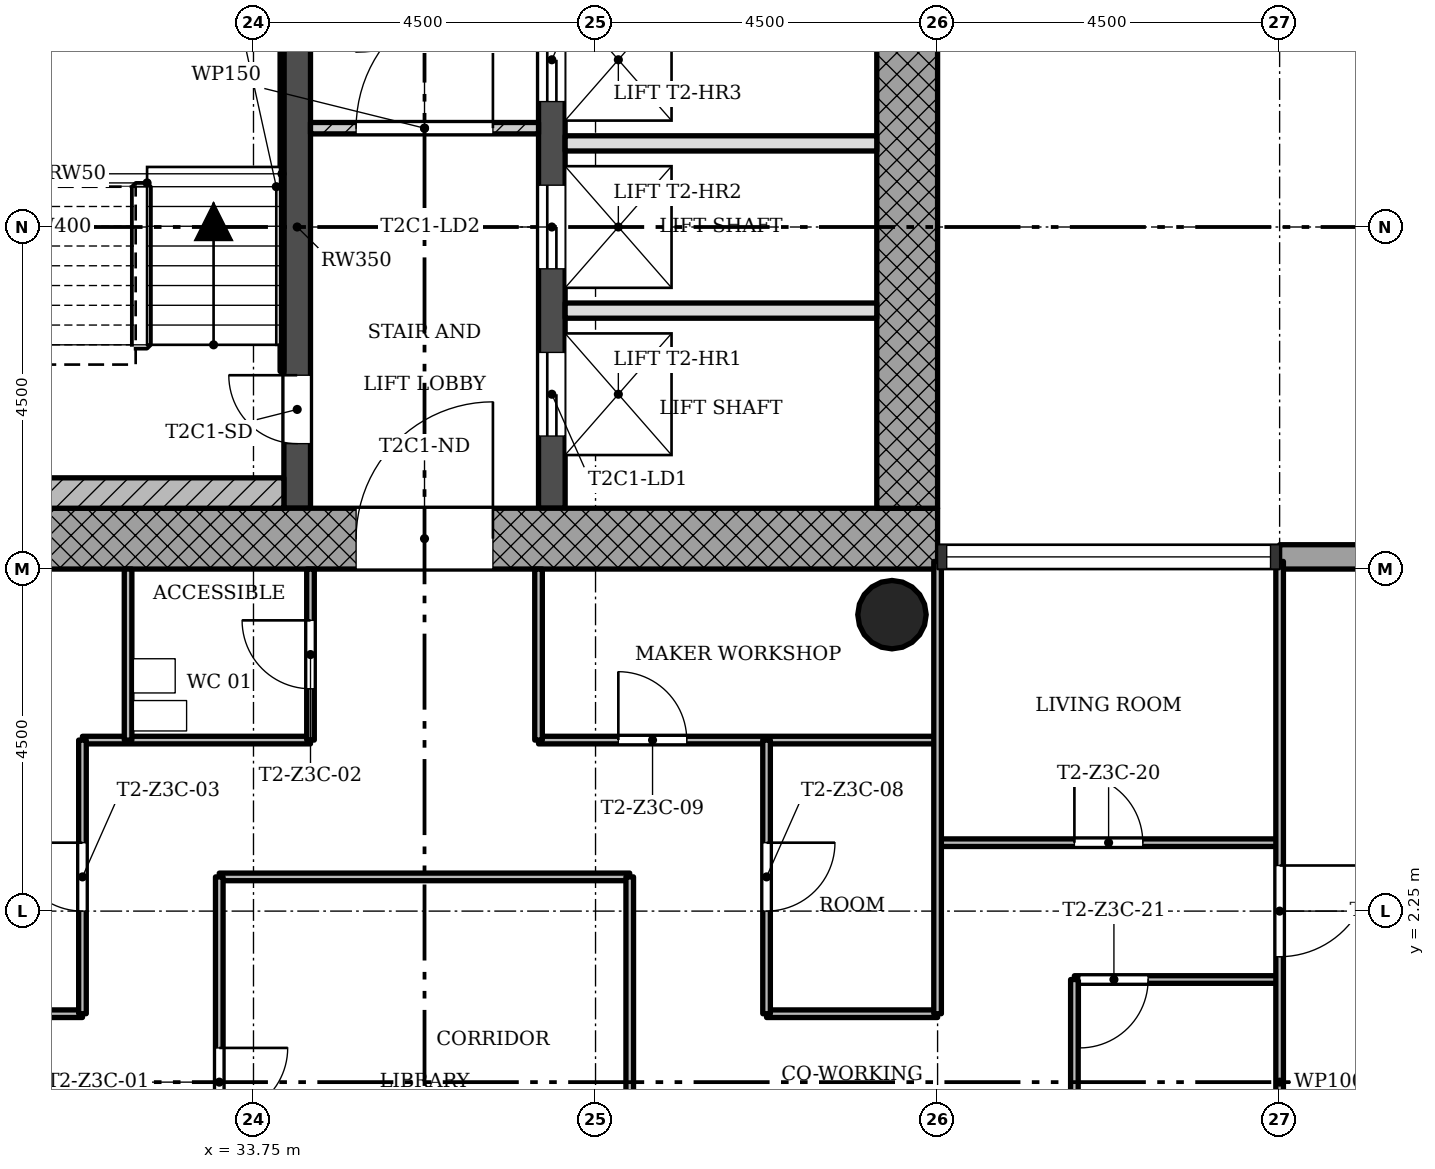
"""IFC4 building model, lengths in metres.
Left out: names, types, materials, properties, quantities, classifications, styles, units other than length and angle.
Written with IfcOpenShell. Run it as: python <this file> out.ifc"""

import sys

from ifc_helpers import new_model, si_unit, direction, frame, frame_2d, origin, origin_2d, place, context, subcontext, project, spatial, rectangle, hollow_circle, extrude, element, fill, save


model = new_model("IFC4")
c1 = context("Model", 3, precision=1e-05, world=origin(), true_north=direction((0.0, 1.0)))
c2 = subcontext(c1, "Body", "Model", "MODEL_VIEW")
j1 = project(units=[si_unit("LENGTHUNIT", "METRE"), si_unit("PLANEANGLEUNIT", "RADIAN")], contexts=[c1])
p1 = place(None, origin())
s1 = spatial("IfcSite", under=j1, at=p1, CompositionType="ELEMENT")
p2 = place(p1, origin())
s2 = spatial("IfcBuilding", under=s1, at=p2, CompositionType="ELEMENT")
p3 = place(p2, frame((0.0, 0.0, 157.5)))
s3 = spatial("IfcBuildingStorey", under=s2, at=p3, CompositionType="ELEMENT", Elevation=157.5)
p4 = place(p3, frame((30.05, 7.15, 0.0), z_axis=(0.0, 0.0, 1.0), x_axis=(1.0, 0.0, 0.0)))
e1 = element("IfcWall", 1, at=p4, inside=s3, PredefinedType="SHEAR", context=c2, shape_type="SweptSolid", body=[
    extrude(rectangle(XDim=12.7, YDim=0.8, at=frame_2d((6.35, 0.0))), origin(), (0.0, 0.0, 1.0), 3.4),
])
p5 = place(p4, frame((5.05, 0.0, 0.0)))
e2 = element("IfcOpeningElement", 2, at=p5, cuts=e1, PredefinedType="OPENING", context=c2, shape_type="SweptSolid", body=[
    extrude(rectangle(XDim=1.8, YDim=2.1, at=frame_2d((0.9, 1.05))), frame((0.0, 0.41, 0.0), z_axis=(0.0, -1.0, 0.0), x_axis=(1.0, 0.0, 0.0)), (0.0, 0.0, 1.0), 0.82),
])
p6 = place(p3, frame((42.35, 7.55, 0.0), z_axis=(0.0, 0.0, 1.0), x_axis=(0.0, 1.0, 0.0)))
e3 = element("IfcWall", 3, at=p6, inside=s3, PredefinedType="SHEAR", context=c2, shape_type="SweptSolid", body=[
    extrude(rectangle(XDim=8.2, YDim=0.8, at=frame_2d((4.1, 0.0))), origin(), (0.0, 0.0, 1.0), 3.4),
])
p7 = place(p3, frame((34.325, 7.55, 0.0), z_axis=(0.0, 0.0, 1.0), x_axis=(0.0, 1.0, 0.0)))
e4 = element("IfcWall", 4, at=p7, inside=s3, PredefinedType="SHEAR", context=c2, shape_type="SweptSolid", body=[
    extrude(rectangle(XDim=7.4, YDim=0.35, at=frame_2d((3.7, 0.0))), origin(), (0.0, 0.0, 1.0), 3.4),
])
p8 = place(p7, frame((0.85, 0.0, 0.0)))
e5 = element("IfcOpeningElement", 5, at=p8, cuts=e4, PredefinedType="OPENING", context=c2, shape_type="SweptSolid", body=[
    extrude(rectangle(XDim=0.9, YDim=2.1, at=frame_2d((0.45, 1.05))), frame((0.0, 0.185, 0.0), z_axis=(0.0, -1.0, 0.0), x_axis=(1.0, 0.0, 0.0)), (0.0, 0.0, 1.0), 0.37),
])
p9 = place(p3, frame((37.675, 7.55, 0.0), z_axis=(0.0, 0.0, 1.0), x_axis=(0.0, 1.0, 0.0)))
e6 = element("IfcWall", 6, at=p9, inside=s3, PredefinedType="SHEAR", context=c2, shape_type="SweptSolid", body=[
    extrude(rectangle(XDim=7.4, YDim=0.35, at=frame_2d((3.7, 0.0))), origin(), (0.0, 0.0, 1.0), 3.4),
])
p10 = place(p9, frame((0.95, 0.0, 0.0)))
e7 = element("IfcOpeningElement", 7, at=p10, cuts=e6, PredefinedType="OPENING", context=c2, shape_type="SweptSolid", body=[
    extrude(rectangle(XDim=1.1, YDim=2.1, at=frame_2d((0.55, 1.05))), frame((0.0, 0.185, 0.0), z_axis=(0.0, -1.0, 0.0), x_axis=(1.0, 0.0, 0.0)), (0.0, 0.0, 1.0), 0.37),
])
p11 = place(p9, frame((3.15, 0.0, 0.0)))
e8 = element("IfcOpeningElement", 8, at=p11, cuts=e6, PredefinedType="OPENING", context=c2, shape_type="SweptSolid", body=[
    extrude(rectangle(XDim=1.1, YDim=2.1, at=frame_2d((0.55, 1.05))), frame((0.0, 0.185, 0.0), z_axis=(0.0, -1.0, 0.0), x_axis=(1.0, 0.0, 0.0)), (0.0, 0.0, 1.0), 0.37),
])
p12 = place(p9, frame((5.35, 0.0, 0.0)))
e9 = element("IfcOpeningElement", 9, at=p12, cuts=e6, PredefinedType="OPENING", context=c2, shape_type="SweptSolid", body=[
    extrude(rectangle(XDim=1.1, YDim=2.1, at=frame_2d((0.55, 1.05))), frame((0.0, 0.185, 0.0), z_axis=(0.0, -1.0, 0.0), x_axis=(1.0, 0.0, 0.0)), (0.0, 0.0, 1.0), 0.37),
])
p13 = place(p3, frame((42.15, 6.15, 0.0), z_axis=(0.0, 0.0, 1.0), x_axis=(1.0, 0.0, 0.0)))
e10 = element("IfcColumn", 10, at=p13, inside=s3, PredefinedType="COLUMN", context=c2, shape_type="SweptSolid", body=[
    extrude(hollow_circle(Radius=0.45, WallThickness=0.032, at=origin_2d()), origin(), (0.0, 0.0, 1.0), 3.4),
])
p14 = place(p3, frame((48.75, 6.91, -0.3), z_axis=(0.0, 0.0, 1.0), x_axis=(-1.0, 0.0, 0.0)))
e11 = element("IfcWall", 11, at=p14, inside=s3, PredefinedType="STANDARD", context=c2, shape_type="SweptSolid", body=[
    extrude(rectangle(XDim=1.5, YDim=0.32, at=frame_2d((0.75, 0.0))), origin(), (0.0, 0.0, 1.0), 3.4),
])
p15 = place(p3, frame((37.5, 12.55, 0.0), z_axis=(0.0, 0.0, 1.0), x_axis=(-1.0, 0.0, 0.0)))
e12 = element("IfcWall", 12, at=p15, inside=s3, PredefinedType="PARTITIONING", context=c2, shape_type="SweptSolid", body=[
    extrude(rectangle(XDim=3.0, YDim=0.15, at=frame_2d((1.5, 0.0))), origin(), (0.0, 0.0, 1.0), 3.0),
])
p16 = place(p15, frame((0.6, 0.0, 0.0)))
e13 = element("IfcOpeningElement", 13, at=p16, cuts=e12, PredefinedType="OPENING", context=c2, shape_type="SweptSolid", body=[
    extrude(rectangle(XDim=1.8, YDim=2.1, at=frame_2d((0.9, 1.05))), frame((0.0, 0.085, 0.0), z_axis=(0.0, -1.0, 0.0), x_axis=(1.0, 0.0, 0.0)), (0.0, 0.0, 1.0), 0.17),
])
for number, where, z_axis, x_axis in (
    (14, (41.95, 10.15, 0.0), (0.0, 0.0, 1.0), (-1.0, 0.0, 0.0)),
    (15, (41.95, 12.35, 0.0), (0.0, 0.0, 1.0), (-1.0, 0.0, 0.0)),
):
    element("IfcWall", number, at=place(p3, frame(where, z_axis=z_axis, x_axis=x_axis)), inside=s3, PredefinedType="SOLIDWALL", context=c2, shape_type="SweptSolid", body=[
        extrude(rectangle(XDim=4.1, YDim=0.2, at=frame_2d((2.05, 0.0))), origin(), (0.0, 0.0, 1.0), 3.0),
    ])
for number, where, z_axis, x_axis in (
    (16, (42.75, 0.9, 0.0), (0.0, 0.0, 1.0), (-1.0, 0.0, 0.0)),
    (17, (31.5, 0.9, 0.0), (0.0, 0.0, 1.0), (-1.0, 0.0, 0.0)),
):
    element("IfcWall", number, at=place(p3, frame(where, z_axis=z_axis, x_axis=x_axis)), inside=s3, PredefinedType="PARTITIONING", context=c2, shape_type="SweptSolid", body=[
        extrude(rectangle(XDim=2.25, YDim=0.1, at=frame_2d((1.125, 0.0))), origin(), (0.0, 0.0, 1.0), 3.0),
    ])
p17 = place(p3, frame((47.25, 1.35, 0.0), z_axis=(0.0, 0.0, 1.0), x_axis=(-1.0, 0.0, 0.0)))
e18 = element("IfcWall", 18, at=p17, inside=s3, PredefinedType="PARTITIONING", context=c2, shape_type="SweptSolid", body=[
    extrude(rectangle(XDim=2.7, YDim=0.1, at=frame_2d((1.35, 0.0))), origin(), (0.0, 0.0, 1.0), 3.0),
])
p18 = place(p17, frame((1.73, 0.0, 0.0)))
e19 = element("IfcOpeningElement", 19, at=p18, cuts=e18, PredefinedType="OPENING", context=c2, shape_type="SweptSolid", body=[
    extrude(rectangle(XDim=0.9, YDim=2.1, at=frame_2d((0.45, 1.05))), frame((0.0, 0.06, 0.0), z_axis=(0.0, -1.0, 0.0), x_axis=(1.0, 0.0, 0.0)), (0.0, 0.0, 1.0), 0.12),
])
p19 = place(p3, frame((38.7, 2.7, 0.0), z_axis=(0.0, 0.0, 1.0), x_axis=(-1.0, 0.0, 0.0)))
e20 = element("IfcWall", 20, at=p19, inside=s3, PredefinedType="PARTITIONING", context=c2, shape_type="SweptSolid", body=[
    extrude(rectangle(XDim=5.4, YDim=0.1, at=frame_2d((2.7, 0.0))), origin(), (0.0, 0.0, 1.0), 3.0),
])
p20 = place(p3, frame((47.25, 3.15, 0.0), z_axis=(0.0, 0.0, 1.0), x_axis=(-1.0, 0.0, 0.0)))
e21 = element("IfcWall", 21, at=p20, inside=s3, PredefinedType="PARTITIONING", context=c2, shape_type="SweptSolid", body=[
    extrude(rectangle(XDim=4.5, YDim=0.1, at=frame_2d((2.25, 0.0))), origin(), (0.0, 0.0, 1.0), 3.0),
])
p21 = place(p20, frame((1.8, 0.0, 0.0)))
e22 = element("IfcOpeningElement", 22, at=p21, cuts=e21, PredefinedType="OPENING", context=c2, shape_type="SweptSolid", body=[
    extrude(rectangle(XDim=0.9, YDim=2.1, at=frame_2d((0.45, 1.05))), frame((0.0, 0.06, 0.0), z_axis=(0.0, -1.0, 0.0), x_axis=(1.0, 0.0, 0.0)), (0.0, 0.0, 1.0), 0.12),
])
p22 = place(p3, frame((42.75, 4.5, 0.0), z_axis=(0.0, 0.0, 1.0), x_axis=(-1.0, 0.0, 0.0)))
e23 = element("IfcWall", 23, at=p22, inside=s3, PredefinedType="PARTITIONING", context=c2, shape_type="SweptSolid", body=[
    extrude(rectangle(XDim=5.25, YDim=0.1, at=frame_2d((2.625, 0.0))), origin(), (0.0, 0.0, 1.0), 3.0),
])
p23 = place(p22, frame((3.3, 0.0, 0.0)))
e24 = element("IfcOpeningElement", 24, at=p23, cuts=e23, PredefinedType="OPENING", context=c2, shape_type="SweptSolid", body=[
    extrude(rectangle(XDim=0.9, YDim=2.1, at=frame_2d((0.45, 1.05))), frame((0.0, 0.06, 0.0), z_axis=(0.0, -1.0, 0.0), x_axis=(1.0, 0.0, 0.0)), (0.0, 0.0, 1.0), 0.12),
])
p24 = place(p3, frame((34.5, 4.5, 0.0), z_axis=(0.0, 0.0, 1.0), x_axis=(-1.0, 0.0, 0.0)))
e25 = element("IfcWall", 25, at=p24, inside=s3, PredefinedType="PARTITIONING", context=c2, shape_type="SweptSolid", body=[
    extrude(rectangle(XDim=3.0, YDim=0.1, at=frame_2d((1.5, 0.0))), origin(), (0.0, 0.0, 1.0), 3.0),
])
p25 = place(p3, frame((47.25, -6.85, 0.0), z_axis=(0.0, 0.0, 1.0), x_axis=(0.0, 1.0, 0.0)))
e26 = element("IfcWall", 26, at=p25, inside=s3, PredefinedType="PARTITIONING", context=c2, shape_type="SweptSolid", body=[
    extrude(rectangle(XDim=13.7, YDim=0.1, at=frame_2d((6.85, 0.0))), origin(), (0.0, 0.0, 1.0), 3.0),
])
p26 = place(p25, frame((8.5, 0.0, 0.0)))
e27 = element("IfcOpeningElement", 27, at=p26, cuts=e26, PredefinedType="OPENING", context=c2, shape_type="SweptSolid", body=[
    extrude(rectangle(XDim=1.2, YDim=2.1, at=frame_2d((0.6, 1.05))), frame((0.0, 0.06, 0.0), z_axis=(0.0, -1.0, 0.0), x_axis=(1.0, 0.0, 0.0)), (0.0, 0.0, 1.0), 0.12),
])
p27 = place(p3, frame((44.55, -0.9, 0.0), z_axis=(0.0, 0.0, 1.0), x_axis=(0.0, 1.0, 0.0)))
e28 = element("IfcWall", 28, at=p27, inside=s3, PredefinedType="PARTITIONING", context=c2, shape_type="SweptSolid", body=[
    extrude(rectangle(XDim=2.25, YDim=0.1, at=frame_2d((1.125, 0.0))), origin(), (0.0, 0.0, 1.0), 3.0),
])
p28 = place(p3, frame((42.75, 0.9, 0.0), z_axis=(0.0, 0.0, 1.0), x_axis=(0.0, 1.0, 0.0)))
e29 = element("IfcWall", 29, at=p28, inside=s3, PredefinedType="PARTITIONING", context=c2, shape_type="SweptSolid", body=[
    extrude(rectangle(XDim=5.95, YDim=0.1, at=frame_2d((2.975, 0.0))), origin(), (0.0, 0.0, 1.0), 3.0),
])
p29 = place(p3, frame((40.5, 0.9, 0.0), z_axis=(0.0, 0.0, 1.0), x_axis=(0.0, 1.0, 0.0)))
e30 = element("IfcWall", 30, at=p29, inside=s3, PredefinedType="PARTITIONING", context=c2, shape_type="SweptSolid", body=[
    extrude(rectangle(XDim=3.6, YDim=0.1, at=frame_2d((1.8, 0.0))), origin(), (0.0, 0.0, 1.0), 3.0),
])
p30 = place(p29, frame((1.35, 0.0, 0.0)))
e31 = element("IfcOpeningElement", 31, at=p30, cuts=e30, PredefinedType="OPENING", context=c2, shape_type="SweptSolid", body=[
    extrude(rectangle(XDim=0.9, YDim=2.1, at=frame_2d((0.45, 1.05))), frame((0.0, 0.06, 0.0), z_axis=(0.0, -1.0, 0.0), x_axis=(1.0, 0.0, 0.0)), (0.0, 0.0, 1.0), 0.12),
])
p31 = place(p3, frame((38.7, -2.7, 0.0), z_axis=(0.0, 0.0, 1.0), x_axis=(0.0, 1.0, 0.0)))
e32 = element("IfcWall", 32, at=p31, inside=s3, PredefinedType="PARTITIONING", context=c2, shape_type="SweptSolid", body=[
    extrude(rectangle(XDim=5.4, YDim=0.1, at=frame_2d((2.7, 0.0))), origin(), (0.0, 0.0, 1.0), 3.0),
])
p32 = place(p3, frame((37.5, 4.5, 0.0), z_axis=(0.0, 0.0, 1.0), x_axis=(0.0, 1.0, 0.0)))
e33 = element("IfcWall", 33, at=p32, inside=s3, PredefinedType="PARTITIONING", context=c2, shape_type="SweptSolid", body=[
    extrude(rectangle(XDim=2.25, YDim=0.1, at=frame_2d((1.125, 0.0))), origin(), (0.0, 0.0, 1.0), 3.0),
])
p33 = place(p3, frame((34.5, 4.5, 0.0), z_axis=(0.0, 0.0, 1.0), x_axis=(0.0, 1.0, 0.0)))
e34 = element("IfcWall", 34, at=p33, inside=s3, PredefinedType="PARTITIONING", context=c2, shape_type="SweptSolid", body=[
    extrude(rectangle(XDim=2.25, YDim=0.1, at=frame_2d((1.125, 0.0))), origin(), (0.0, 0.0, 1.0), 3.0),
])
p34 = place(p33, frame((0.675, 0.0, 0.0)))
e35 = element("IfcOpeningElement", 35, at=p34, cuts=e34, PredefinedType="OPENING", context=c2, shape_type="SweptSolid", body=[
    extrude(rectangle(XDim=0.9, YDim=2.1, at=frame_2d((0.45, 1.05))), frame((0.0, 0.06, 0.0), z_axis=(0.0, -1.0, 0.0), x_axis=(1.0, 0.0, 0.0)), (0.0, 0.0, 1.0), 0.12),
])
p35 = place(p3, frame((33.3, -2.7, 0.0), z_axis=(0.0, 0.0, 1.0), x_axis=(0.0, 1.0, 0.0)))
e36 = element("IfcWall", 36, at=p35, inside=s3, PredefinedType="PARTITIONING", context=c2, shape_type="SweptSolid", body=[
    extrude(rectangle(XDim=5.4, YDim=0.1, at=frame_2d((2.7, 0.0))), origin(), (0.0, 0.0, 1.0), 3.0),
])
p36 = place(p35, frame((2.25, 0.0, 0.0)))
e37 = element("IfcOpeningElement", 37, at=p36, cuts=e36, PredefinedType="OPENING", context=c2, shape_type="SweptSolid", body=[
    extrude(rectangle(XDim=0.9, YDim=2.1, at=frame_2d((0.45, 1.05))), frame((0.0, 0.06, 0.0), z_axis=(0.0, -1.0, 0.0), x_axis=(1.0, 0.0, 0.0)), (0.0, 0.0, 1.0), 0.12),
])
p37 = place(p3, frame((32.1, 4.5, 0.0), z_axis=(0.0, 0.0, 1.0), x_axis=(0.0, 1.0, 0.0)))
e38 = element("IfcWall", 38, at=p37, inside=s3, PredefinedType="PARTITIONING", context=c2, shape_type="SweptSolid", body=[
    extrude(rectangle(XDim=2.25, YDim=0.1, at=frame_2d((1.125, 0.0))), origin(), (0.0, 0.0, 1.0), 3.0),
])
p38 = place(p3, frame((31.5, 0.9, 0.0), z_axis=(0.0, 0.0, 1.0), x_axis=(0.0, 1.0, 0.0)))
e39 = element("IfcWall", 39, at=p38, inside=s3, PredefinedType="PARTITIONING", context=c2, shape_type="SweptSolid", body=[
    extrude(rectangle(XDim=3.6, YDim=0.1, at=frame_2d((1.8, 0.0))), origin(), (0.0, 0.0, 1.0), 3.0),
])
p39 = place(p38, frame((1.35, 0.0, 0.0)))
e40 = element("IfcOpeningElement", 40, at=p39, cuts=e39, PredefinedType="OPENING", context=c2, shape_type="SweptSolid", body=[
    extrude(rectangle(XDim=0.9, YDim=2.1, at=frame_2d((0.45, 1.05))), frame((0.0, 0.06, 0.0), z_axis=(0.0, -1.0, 0.0), x_axis=(1.0, 0.0, 0.0)), (0.0, 0.0, 1.0), 0.12),
])
p40 = place(p3, frame((34.15, 7.75, 0.0), z_axis=(0.0, 0.0, 1.0), x_axis=(-1.0, 0.0, 0.0)))
e41 = element("IfcWall", 41, at=p40, inside=s3, PredefinedType="SHEAR", context=c2, shape_type="SweptSolid", body=[
    extrude(rectangle(XDim=4.1, YDim=0.4, at=frame_2d((2.05, 0.0))), origin(), (0.0, 0.0, 1.0), 3.4),
])
p41 = place(p3, frame((34.125, 9.35, 0.0), z_axis=(0.0, 0.0, 1.0), x_axis=(0.0, 1.0, 0.0)))
e42 = element("IfcWall", 42, at=p41, inside=s3, PredefinedType="SHEAR", context=c2, shape_type="SweptSolid", body=[
    extrude(rectangle(XDim=5.2, YDim=0.05, at=frame_2d((2.6, 0.0))), origin(), (0.0, 0.0, 1.0), 3.4),
])
p42 = place(p16, origin())
e43 = element("IfcDoor", 43, at=p42, inside=s3, OperationType="SINGLE_SWING_LEFT", PredefinedType="DOOR", context=c2, shape_type="SweptSolid", body=[
    extrude(rectangle(XDim=1.8, YDim=2.1, at=frame_2d((0.9, 1.05))), frame((0.0, 0.025, 0.0), z_axis=(0.0, -1.0, 0.0), x_axis=(1.0, 0.0, 0.0)), (0.0, 0.0, 1.0), 0.05),
])
fill(e13, e43)
p43 = place(p36, origin())
e44 = element("IfcDoor", 44, at=p43, inside=s3, OperationType="SINGLE_SWING_RIGHT", PredefinedType="DOOR", context=c2, shape_type="SweptSolid", body=[
    extrude(rectangle(XDim=0.9, YDim=2.1, at=frame_2d((0.45, 1.05))), frame((0.0, 0.025, 0.0), z_axis=(0.0, -1.0, 0.0), x_axis=(1.0, 0.0, 0.0)), (0.0, 0.0, 1.0), 0.05),
])
fill(e37, e44)
p44 = place(p34, origin())
e45 = element("IfcDoor", 45, at=p44, inside=s3, OperationType="SINGLE_SWING_LEFT", PredefinedType="DOOR", context=c2, shape_type="SweptSolid", body=[
    extrude(rectangle(XDim=0.9, YDim=2.1, at=frame_2d((0.45, 1.05))), frame((0.0, 0.025, 0.0), z_axis=(0.0, -1.0, 0.0), x_axis=(1.0, 0.0, 0.0)), (0.0, 0.0, 1.0), 0.05),
])
fill(e35, e45)
p45 = place(p39, origin())
e46 = element("IfcDoor", 46, at=p45, inside=s3, OperationType="SINGLE_SWING_LEFT", PredefinedType="DOOR", context=c2, shape_type="SweptSolid", body=[
    extrude(rectangle(XDim=0.9, YDim=2.1, at=frame_2d((0.45, 1.05))), frame((0.0, 0.025, 0.0), z_axis=(0.0, -1.0, 0.0), x_axis=(1.0, 0.0, 0.0)), (0.0, 0.0, 1.0), 0.05),
])
fill(e40, e46)
p46 = place(p30, origin())
e47 = element("IfcDoor", 47, at=p46, inside=s3, OperationType="SINGLE_SWING_RIGHT", PredefinedType="DOOR", context=c2, shape_type="SweptSolid", body=[
    extrude(rectangle(XDim=0.9, YDim=2.1, at=frame_2d((0.45, 1.05))), frame((0.0, 0.025, 0.0), z_axis=(0.0, -1.0, 0.0), x_axis=(1.0, 0.0, 0.0)), (0.0, 0.0, 1.0), 0.05),
])
fill(e31, e47)
p47 = place(p23, origin())
e48 = element("IfcDoor", 48, at=p47, inside=s3, OperationType="SINGLE_SWING_RIGHT", PredefinedType="DOOR", context=c2, shape_type="SweptSolid", body=[
    extrude(rectangle(XDim=0.9, YDim=2.1, at=frame_2d((0.45, 1.05))), frame((0.0, 0.025, 0.0), z_axis=(0.0, -1.0, 0.0), x_axis=(1.0, 0.0, 0.0)), (0.0, 0.0, 1.0), 0.05),
])
fill(e24, e48)
p48 = place(p21, origin())
e49 = element("IfcDoor", 49, at=p48, inside=s3, OperationType="SINGLE_SWING_RIGHT", PredefinedType="DOOR", context=c2, shape_type="SweptSolid", body=[
    extrude(rectangle(XDim=0.9, YDim=2.1, at=frame_2d((0.45, 1.05))), frame((0.0, 0.025, 0.0), z_axis=(0.0, -1.0, 0.0), x_axis=(1.0, 0.0, 0.0)), (0.0, 0.0, 1.0), 0.05),
])
fill(e22, e49)
p49 = place(p18, origin())
e50 = element("IfcDoor", 50, at=p49, inside=s3, OperationType="SINGLE_SWING_LEFT", PredefinedType="DOOR", context=c2, shape_type="SweptSolid", body=[
    extrude(rectangle(XDim=0.9, YDim=2.1, at=frame_2d((0.45, 1.05))), frame((0.0, 0.025, 0.0), z_axis=(0.0, -1.0, 0.0), x_axis=(1.0, 0.0, 0.0)), (0.0, 0.0, 1.0), 0.05),
])
fill(e19, e50)
p50 = place(p26, origin())
e51 = element("IfcDoor", 51, at=p50, inside=s3, OperationType="SINGLE_SWING_RIGHT", PredefinedType="DOOR", context=c2, shape_type="SweptSolid", body=[
    extrude(rectangle(XDim=1.2, YDim=2.1, at=frame_2d((0.6, 1.05))), frame((0.0, 0.025, 0.0), z_axis=(0.0, -1.0, 0.0), x_axis=(1.0, 0.0, 0.0)), (0.0, 0.0, 1.0), 0.05),
])
fill(e27, e51)
p51 = place(p8, origin())
e52 = element("IfcDoor", 52, at=p51, inside=s3, OperationType="SINGLE_SWING_LEFT", PredefinedType="DOOR", context=c2, shape_type="SweptSolid", body=[
    extrude(rectangle(XDim=0.9, YDim=2.1, at=frame_2d((0.45, 1.05))), frame((0.0, 0.025, 0.0), z_axis=(0.0, -1.0, 0.0), x_axis=(1.0, 0.0, 0.0)), (0.0, 0.0, 1.0), 0.05),
])
fill(e5, e52)
p52 = place(p10, origin())
e53 = element("IfcDoor", 53, at=p52, inside=s3, OperationType="SLIDING_TO_LEFT", PredefinedType="DOOR", context=c2, shape_type="SweptSolid", body=[
    extrude(rectangle(XDim=1.1, YDim=2.1, at=frame_2d((0.55, 1.05))), frame((0.0, 0.025, 0.0), z_axis=(0.0, -1.0, 0.0), x_axis=(1.0, 0.0, 0.0)), (0.0, 0.0, 1.0), 0.05),
])
fill(e7, e53)
p53 = place(p11, origin())
e54 = element("IfcDoor", 54, at=p53, inside=s3, OperationType="SLIDING_TO_LEFT", PredefinedType="DOOR", context=c2, shape_type="SweptSolid", body=[
    extrude(rectangle(XDim=1.1, YDim=2.1, at=frame_2d((0.55, 1.05))), frame((0.0, 0.025, 0.0), z_axis=(0.0, -1.0, 0.0), x_axis=(1.0, 0.0, 0.0)), (0.0, 0.0, 1.0), 0.05),
])
fill(e8, e54)
p54 = place(p12, origin())
e55 = element("IfcDoor", 55, at=p54, inside=s3, OperationType="SLIDING_TO_LEFT", PredefinedType="DOOR", context=c2, shape_type="SweptSolid", body=[
    extrude(rectangle(XDim=1.1, YDim=2.1, at=frame_2d((0.55, 1.05))), frame((0.0, 0.025, 0.0), z_axis=(0.0, -1.0, 0.0), x_axis=(1.0, 0.0, 0.0)), (0.0, 0.0, 1.0), 0.05),
])
fill(e9, e55)
p55 = place(p5, origin())
e56 = element("IfcDoor", 56, at=p55, inside=s3, OperationType="SINGLE_SWING_LEFT", PredefinedType="DOOR", context=c2, shape_type="SweptSolid", body=[
    extrude(rectangle(XDim=1.8, YDim=2.1, at=frame_2d((0.9, 1.05))), frame((0.0, 0.025, 0.0), z_axis=(0.0, -1.0, 0.0), x_axis=(1.0, 0.0, 0.0)), (0.0, 0.0, 1.0), 0.05),
])
fill(e2, e56)
save(model, sys.argv[1])
